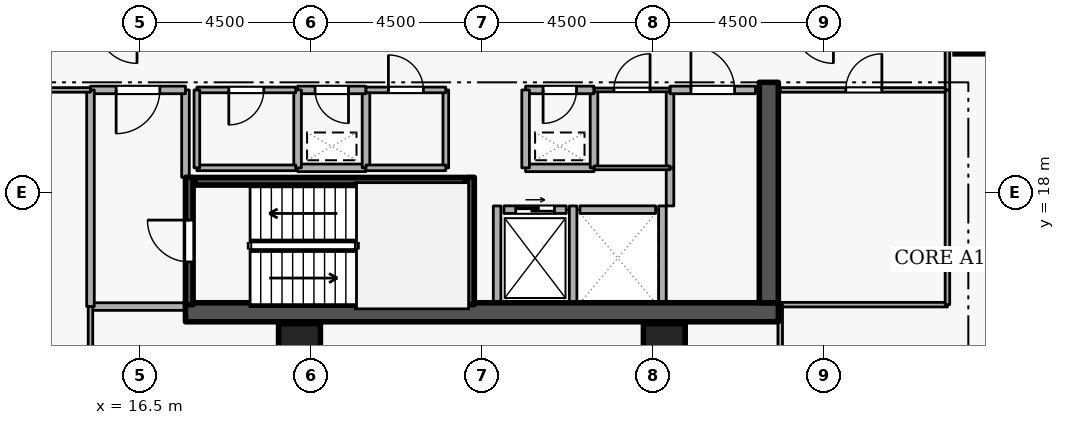
"""IFC4 building model, lengths in metres.
Left out: names, types, materials, properties, quantities, classifications, styles, units other than length and angle.
Written with IfcOpenShell. Run it as: python <this file> out.ifc"""

import sys

from ifc_helpers import new_model, si_unit, direction, frame, frame_2d, origin, origin_2d, place, context, subcontext, project, spatial, rectangle, extrude, element, fill, save


model = new_model("IFC4")
c1 = context("Model", 3, precision=1e-05, world=origin(), true_north=direction((0.0, 1.0)))
c2 = subcontext(c1, "Body", "Model", "MODEL_VIEW")
j1 = project(units=[si_unit("LENGTHUNIT", "METRE"), si_unit("PLANEANGLEUNIT", "RADIAN")], contexts=[c1])
p1 = place(None, origin())
s1 = spatial("IfcSite", under=j1, at=p1, CompositionType="ELEMENT")
p2 = place(p1, origin())
s2 = spatial("IfcBuilding", under=s1, at=p2, CompositionType="ELEMENT")
p3 = place(p2, frame((0.0, 0.0, 149.1)))
s3 = spatial("IfcBuildingStorey", under=s2, at=p3, CompositionType="ELEMENT", Elevation=149.1)
p4 = place(p3, frame((17.7, 14.85, 0.0), z_axis=(0.0, 0.0, 1.0), x_axis=(1.0, 0.0, 0.0)))
e1 = element("IfcWall", 1, at=p4, inside=s3, PredefinedType="SHEAR", context=c2, shape_type="SweptSolid", body=[
    extrude(rectangle(XDim=15.6, YDim=0.5, at=frame_2d((7.8, 0.0))), origin(), (0.0, 0.0, 1.0), 3.6),
])
p5 = place(p3, frame((33.05, 15.1, 0.0), z_axis=(0.0, 0.0, 1.0), x_axis=(0.0, 1.0, 0.0)))
e2 = element("IfcWall", 2, at=p5, inside=s3, PredefinedType="SHEAR", context=c2, shape_type="SweptSolid", body=[
    extrude(rectangle(XDim=5.8, YDim=0.5, at=frame_2d((2.9, 0.0))), origin(), (0.0, 0.0, 1.0), 3.6),
])
for number, where, z_axis, x_axis in (
    (3, (38.5, 22.2, 0.0), (0.0, 0.0, 1.0), (1.0, 0.0, 0.0)),
    (4, (20.7, 14.0, 0.0), (0.0, 0.0, 1.0), (1.0, 0.0, 0.0)),
    (5, (30.3, 14.0, 0.0), (0.0, 0.0, 1.0), (1.0, 0.0, 0.0)),
):
    element("IfcColumn", number, at=place(p3, frame(where, z_axis=z_axis, x_axis=x_axis)), inside=s3, PredefinedType="COLUMN", context=c2, shape_type="SweptSolid", body=[
        extrude(rectangle(XDim=1.1, YDim=1.1, at=origin_2d()), origin(), (0.0, 0.0, 1.0), 3.6),
    ])
p6 = place(p3, frame((26.08, 17.55, 0.0), z_axis=(0.0, 0.0, 1.0), x_axis=(1.0, 0.0, 0.0)))
e6 = element("IfcWall", 6, at=p6, inside=s3, PredefinedType="STANDARD", context=c2, shape_type="SweptSolid", body=[
    extrude(rectangle(XDim=1.64, YDim=0.2, at=frame_2d((0.82, 0.0))), origin(), (0.0, 0.0, 1.0), 3.3),
])
p7 = place(p6, frame((0.31, 0.0, 0.0)))
e7 = element("IfcOpeningElement", 7, at=p7, cuts=e6, PredefinedType="OPENING", context=c2, shape_type="SweptSolid", body=[
    extrude(rectangle(XDim=1.02, YDim=2.06, at=frame_2d((0.51, 1.03))), frame((0.0, 0.11, 0.0), z_axis=(0.0, -1.0, 0.0), x_axis=(1.0, 0.0, 0.0)), (0.0, 0.0, 1.0), 0.22),
])
p8 = place(p3, frame((28.08, 17.55, 0.0), z_axis=(0.0, 0.0, 1.0), x_axis=(1.0, 0.0, 0.0)))
e8 = element("IfcWall", 8, at=p8, inside=s3, PredefinedType="STANDARD", context=c2, shape_type="SweptSolid", body=[
    extrude(rectangle(XDim=1.99, YDim=0.2, at=frame_2d((0.995, 0.0))), origin(), (0.0, 0.0, 1.0), 3.3),
])
for number, where, z_axis, x_axis in (
    (9, (27.9, 15.112, 0.0), (0.0, 0.0, 1.0), (0.0, 1.0, 0.0)),
    (10, (25.9, 15.112, 0.0), (0.0, 0.0, 1.0), (0.0, 1.0, 0.0)),
    (11, (30.25, 15.112, 0.0), (0.0, 0.0, 1.0), (0.0, 1.0, 0.0)),
):
    element("IfcWall", number, at=place(p3, frame(where, z_axis=z_axis, x_axis=x_axis)), inside=s3, PredefinedType="STANDARD", context=c2, shape_type="SweptSolid", body=[
        extrude(rectangle(XDim=2.536, YDim=0.2, at=frame_2d((1.268, 0.0))), origin(), (0.0, 0.0, 1.0), 3.3),
    ])
p9 = place(p3, frame((17.8, 15.05, 0.0), z_axis=(0.0, 0.0, 1.0), x_axis=(0.0, 1.0, 0.0)))
e12 = element("IfcWall", 12, at=p9, inside=s3, PredefinedType="SHEAR", context=c2, shape_type="SweptSolid", body=[
    extrude(rectangle(XDim=3.35, YDim=0.2, at=frame_2d((1.675, 0.0))), origin(), (0.0, 0.0, 1.0), 3.6),
])
p10 = place(p9, frame((1.125, 0.0, 0.0)))
e13 = element("IfcOpeningElement", 13, at=p10, cuts=e12, PredefinedType="OPENING", context=c2, shape_type="SweptSolid", body=[
    extrude(rectangle(XDim=1.1, YDim=2.1, at=frame_2d((0.55, 1.05))), frame((0.0, 0.11, 0.0), z_axis=(0.0, -1.0, 0.0), x_axis=(1.0, 0.0, 0.0)), (0.0, 0.0, 1.0), 0.22),
])
p11 = place(p3, frame((25.2, 18.4, 0.0), z_axis=(0.0, 0.0, 1.0), x_axis=(0.0, -1.0, 0.0)))
e14 = element("IfcWall", 14, at=p11, inside=s3, PredefinedType="SHEAR", context=c2, shape_type="SweptSolid", body=[
    extrude(rectangle(XDim=3.35, YDim=0.2, at=frame_2d((1.675, 0.0))), origin(), (0.0, 0.0, 1.0), 3.6),
])
p12 = place(p3, frame((25.05, 18.297, 0.0), z_axis=(0.0, 0.0, 1.0), x_axis=(-1.0, 0.0, 0.0)))
e15 = element("IfcWall", 15, at=p12, inside=s3, PredefinedType="SHEAR", context=c2, shape_type="SweptSolid", body=[
    extrude(rectangle(XDim=7.1, YDim=0.2, at=frame_2d((3.55, 0.0))), origin(), (0.0, 0.0, 1.0), 3.6),
])
p13 = place(p3, frame((15.2, 15.0, 0.0), z_axis=(0.0, 0.0, 1.0), x_axis=(1.0, 0.0, 0.0)))
e16 = element("IfcWall", 16, at=p13, inside=s3, PredefinedType="STANDARD", context=c2, shape_type="SweptSolid", body=[
    extrude(rectangle(XDim=2.5, YDim=0.2, at=frame_2d((1.25, 0.0))), origin(), (0.0, 0.0, 1.0), 3.3),
])
p14 = place(p3, frame((17.7, 18.4, 0.0), z_axis=(0.0, 0.0, 1.0), x_axis=(0.0, 1.0, 0.0)))
e17 = element("IfcWall", 17, at=p14, inside=s3, PredefinedType="STANDARD", context=c2, shape_type="SweptSolid", body=[
    extrude(rectangle(XDim=2.3, YDim=0.2, at=frame_2d((1.15, 0.0))), origin(), (0.0, 0.0, 1.0), 2.505),
])
p15 = place(p3, frame((17.7, 20.7, 0.0), z_axis=(0.0, 0.0, 1.0), x_axis=(-1.0, 0.0, 0.0)))
e18 = element("IfcWall", 18, at=p15, inside=s3, PredefinedType="STANDARD", context=c2, shape_type="SweptSolid", body=[
    extrude(rectangle(XDim=2.5, YDim=0.2, at=frame_2d((1.25, 0.0))), origin(), (0.0, 0.0, 1.0), 3.3),
])
p16 = place(p15, frame((0.675, 0.0, 0.0)))
e19 = element("IfcOpeningElement", 19, at=p16, cuts=e18, PredefinedType="OPENING", context=c2, shape_type="SweptSolid", body=[
    extrude(rectangle(XDim=1.15, YDim=2.1, at=frame_2d((0.575, 1.05))), frame((0.0, 0.11, 0.0), z_axis=(0.0, -1.0, 0.0), x_axis=(1.0, 0.0, 0.0)), (0.0, 0.0, 1.0), 0.22),
])
p17 = place(p3, frame((15.2, 20.7, 0.0), z_axis=(0.0, 0.0, 1.0), x_axis=(0.0, -1.0, 0.0)))
e20 = element("IfcWall", 20, at=p17, inside=s3, PredefinedType="STANDARD", context=c2, shape_type="SweptSolid", body=[
    extrude(rectangle(XDim=5.7, YDim=0.2, at=frame_2d((2.85, 0.0))), origin(), (0.0, 0.0, 1.0), 3.3),
])
p18 = place(p3, frame((26.65, 18.65, 0.0), z_axis=(0.0, 0.0, 1.0), x_axis=(1.0, 0.0, 0.0)))
e21 = element("IfcWall", 21, at=p18, inside=s3, PredefinedType="STANDARD", context=c2, shape_type="SweptSolid", body=[
    extrude(rectangle(XDim=1.8, YDim=0.2, at=frame_2d((0.9, 0.0))), origin(), (0.0, 0.0, 1.0), 3.3),
])
p19 = place(p3, frame((28.45, 18.65, 0.0), z_axis=(0.0, 0.0, 1.0), x_axis=(0.0, 1.0, 0.0)))
e22 = element("IfcWall", 22, at=p19, inside=s3, PredefinedType="STANDARD", context=c2, shape_type="SweptSolid", body=[
    extrude(rectangle(XDim=2.05, YDim=0.2, at=frame_2d((1.025, 0.0))), origin(), (0.0, 0.0, 1.0), 3.3),
])
p20 = place(p3, frame((28.45, 20.7, 0.0), z_axis=(0.0, 0.0, 1.0), x_axis=(-1.0, 0.0, 0.0)))
e23 = element("IfcWall", 23, at=p20, inside=s3, PredefinedType="STANDARD", context=c2, shape_type="SweptSolid", body=[
    extrude(rectangle(XDim=1.8, YDim=0.2, at=frame_2d((0.9, 0.0))), origin(), (0.0, 0.0, 1.0), 3.3),
])
p21 = place(p20, frame((0.46, 0.0, 0.0)))
e24 = element("IfcOpeningElement", 24, at=p21, cuts=e23, PredefinedType="OPENING", context=c2, shape_type="SweptSolid", body=[
    extrude(rectangle(XDim=0.88, YDim=2.04, at=frame_2d((0.44, 1.02))), frame((0.0, 0.11, 0.0), z_axis=(0.0, -1.0, 0.0), x_axis=(1.0, 0.0, 0.0)), (0.0, 0.0, 1.0), 0.22),
])
p22 = place(p3, frame((26.65, 20.7, 0.0), z_axis=(0.0, 0.0, 1.0), x_axis=(0.0, -1.0, 0.0)))
e25 = element("IfcWall", 25, at=p22, inside=s3, PredefinedType="STANDARD", context=c2, shape_type="SweptSolid", body=[
    extrude(rectangle(XDim=2.05, YDim=0.2, at=frame_2d((1.025, 0.0))), origin(), (0.0, 0.0, 1.0), 3.3),
])
p23 = place(p3, frame((20.65, 18.65, 0.0), z_axis=(0.0, 0.0, 1.0), x_axis=(1.0, 0.0, 0.0)))
e26 = element("IfcWall", 26, at=p23, inside=s3, PredefinedType="STANDARD", context=c2, shape_type="SweptSolid", body=[
    extrude(rectangle(XDim=1.8, YDim=0.2, at=frame_2d((0.9, 0.0))), origin(), (0.0, 0.0, 1.0), 3.3),
])
p24 = place(p3, frame((22.45, 18.65, 0.0), z_axis=(0.0, 0.0, 1.0), x_axis=(0.0, 1.0, 0.0)))
e27 = element("IfcWall", 27, at=p24, inside=s3, PredefinedType="STANDARD", context=c2, shape_type="SweptSolid", body=[
    extrude(rectangle(XDim=2.05, YDim=0.2, at=frame_2d((1.025, 0.0))), origin(), (0.0, 0.0, 1.0), 3.3),
])
p25 = place(p3, frame((22.45, 20.7, 0.0), z_axis=(0.0, 0.0, 1.0), x_axis=(-1.0, 0.0, 0.0)))
e28 = element("IfcWall", 28, at=p25, inside=s3, PredefinedType="STANDARD", context=c2, shape_type="SweptSolid", body=[
    extrude(rectangle(XDim=1.8, YDim=0.2, at=frame_2d((0.9, 0.0))), origin(), (0.0, 0.0, 1.0), 3.3),
])
p26 = place(p25, frame((0.46, 0.0, 0.0)))
e29 = element("IfcOpeningElement", 29, at=p26, cuts=e28, PredefinedType="OPENING", context=c2, shape_type="SweptSolid", body=[
    extrude(rectangle(XDim=0.88, YDim=2.04, at=frame_2d((0.44, 1.02))), frame((0.0, 0.11, 0.0), z_axis=(0.0, -1.0, 0.0), x_axis=(1.0, 0.0, 0.0)), (0.0, 0.0, 1.0), 0.22),
])
p27 = place(p3, frame((20.65, 20.7, 0.0), z_axis=(0.0, 0.0, 1.0), x_axis=(0.0, -1.0, 0.0)))
e30 = element("IfcWall", 30, at=p27, inside=s3, PredefinedType="STANDARD", context=c2, shape_type="SweptSolid", body=[
    extrude(rectangle(XDim=2.05, YDim=0.2, at=frame_2d((1.025, 0.0))), origin(), (0.0, 0.0, 1.0), 3.3),
])
p28 = place(p3, frame((30.45, 17.648, 0.0), z_axis=(0.0, 0.0, 1.0), x_axis=(0.0, 1.0, 0.0)))
e31 = element("IfcWall", 31, at=p28, inside=s3, PredefinedType="STANDARD", context=c2, shape_type="SweptSolid", body=[
    extrude(rectangle(XDim=1.002, YDim=0.2, at=frame_2d((0.501, 0.0))), origin(), (0.0, 0.0, 1.0), 3.3),
])
p29 = place(p3, frame((30.45, 18.65, 0.0), z_axis=(0.0, 0.0, 1.0), x_axis=(0.0, 1.0, 0.0)))
e32 = element("IfcWall", 32, at=p29, inside=s3, PredefinedType="STANDARD", context=c2, shape_type="SweptSolid", body=[
    extrude(rectangle(XDim=2.05, YDim=0.2, at=frame_2d((1.025, 0.0))), origin(), (0.0, 0.0, 1.0), 3.3),
])
p30 = place(p3, frame((30.45, 20.7, 0.0), z_axis=(0.0, 0.0, 1.0), x_axis=(1.0, 0.0, 0.0)))
e33 = element("IfcWall", 33, at=p30, inside=s3, PredefinedType="STANDARD", context=c2, shape_type="SweptSolid", body=[
    extrude(rectangle(XDim=2.25, YDim=0.2, at=frame_2d((1.125, 0.0))), origin(), (0.0, 0.0, 1.0), 3.3),
])
p31 = place(p30, frame((0.55, 0.0, 0.0)))
e34 = element("IfcOpeningElement", 34, at=p31, cuts=e33, PredefinedType="OPENING", context=c2, shape_type="SweptSolid", body=[
    extrude(rectangle(XDim=1.15, YDim=2.1, at=frame_2d((0.575, 1.05))), frame((0.0, 0.11, 0.0), z_axis=(0.0, -1.0, 0.0), x_axis=(1.0, 0.0, 0.0)), (0.0, 0.0, 1.0), 0.22),
])
p32 = place(p3, frame((18.0, 18.65, 0.0), z_axis=(0.0, 0.0, 1.0), x_axis=(1.0, 0.0, 0.0)))
e35 = element("IfcWall", 35, at=p32, inside=s3, PredefinedType="PARTITIONING", context=c2, shape_type="SweptSolid", body=[
    extrude(rectangle(XDim=2.6, YDim=0.15, at=frame_2d((1.3, 0.0))), origin(), (0.0, 0.0, 1.0), 3.3),
])
p33 = place(p3, frame((20.6, 20.7, 0.0), z_axis=(0.0, 0.0, 1.0), x_axis=(-1.0, 0.0, 0.0)))
e36 = element("IfcWall", 36, at=p33, inside=s3, PredefinedType="PARTITIONING", context=c2, shape_type="SweptSolid", body=[
    extrude(rectangle(XDim=2.6, YDim=0.15, at=frame_2d((1.3, 0.0))), origin(), (0.0, 0.0, 1.0), 3.3),
])
p34 = place(p33, frame((0.84, 0.0, 0.0)))
e37 = element("IfcOpeningElement", 37, at=p34, cuts=e36, PredefinedType="OPENING", context=c2, shape_type="SweptSolid", body=[
    extrude(rectangle(XDim=0.92, YDim=2.08, at=frame_2d((0.46, 1.04))), frame((0.0, 0.085, 0.0), z_axis=(0.0, -1.0, 0.0), x_axis=(1.0, 0.0, 0.0)), (0.0, 0.0, 1.0), 0.17),
])
p35 = place(p3, frame((18.0, 20.7, 0.0), z_axis=(0.0, 0.0, 1.0), x_axis=(0.0, -1.0, 0.0)))
e38 = element("IfcWall", 38, at=p35, inside=s3, PredefinedType="PARTITIONING", context=c2, shape_type="SweptSolid", body=[
    extrude(rectangle(XDim=2.05, YDim=0.15, at=frame_2d((1.025, 0.0))), origin(), (0.0, 0.0, 1.0), 2.505),
])
p36 = place(p3, frame((24.55, 20.7, 0.0), z_axis=(0.0, 0.0, 1.0), x_axis=(0.0, -1.0, 0.0)))
e39 = element("IfcWall", 39, at=p36, inside=s3, PredefinedType="PARTITIONING", context=c2, shape_type="SweptSolid", body=[
    extrude(rectangle(XDim=2.05, YDim=0.15, at=frame_2d((1.025, 0.0))), origin(), (0.0, 0.0, 1.0), 3.3),
])
p37 = place(p3, frame((24.55, 18.65, 0.0), z_axis=(0.0, 0.0, 1.0), x_axis=(-1.0, 0.0, 0.0)))
e40 = element("IfcWall", 40, at=p37, inside=s3, PredefinedType="PARTITIONING", context=c2, shape_type="SweptSolid", body=[
    extrude(rectangle(XDim=2.1, YDim=0.15, at=frame_2d((1.05, 0.0))), origin(), (0.0, 0.0, 1.0), 3.3),
])
p38 = place(p3, frame((22.45, 20.7, 0.0), z_axis=(0.0, 0.0, 1.0), x_axis=(1.0, 0.0, 0.0)))
e41 = element("IfcWall", 41, at=p38, inside=s3, PredefinedType="PARTITIONING", context=c2, shape_type="SweptSolid", body=[
    extrude(rectangle(XDim=2.1, YDim=0.15, at=frame_2d((1.05, 0.0))), origin(), (0.0, 0.0, 1.0), 3.3),
])
p39 = place(p38, frame((0.59, 0.0, 0.0)))
e42 = element("IfcOpeningElement", 42, at=p39, cuts=e41, PredefinedType="OPENING", context=c2, shape_type="SweptSolid", body=[
    extrude(rectangle(XDim=0.92, YDim=2.08, at=frame_2d((0.46, 1.04))), frame((0.0, 0.085, 0.0), z_axis=(0.0, -1.0, 0.0), x_axis=(1.0, 0.0, 0.0)), (0.0, 0.0, 1.0), 0.17),
])
p40 = place(p3, frame((30.45, 18.65, 0.0), z_axis=(0.0, 0.0, 1.0), x_axis=(-1.0, 0.0, 0.0)))
e43 = element("IfcWall", 43, at=p40, inside=s3, PredefinedType="PARTITIONING", context=c2, shape_type="SweptSolid", body=[
    extrude(rectangle(XDim=2.0, YDim=0.1, at=frame_2d((1.0, 0.0))), origin(), (0.0, 0.0, 1.0), 3.3),
])
p41 = place(p3, frame((28.45, 20.7, 0.0), z_axis=(0.0, 0.0, 1.0), x_axis=(1.0, 0.0, 0.0)))
e44 = element("IfcWall", 44, at=p41, inside=s3, PredefinedType="PARTITIONING", context=c2, shape_type="SweptSolid", body=[
    extrude(rectangle(XDim=2.0, YDim=0.1, at=frame_2d((1.0, 0.0))), origin(), (0.0, 0.0, 1.0), 3.3),
])
p42 = place(p41, frame((0.525, 0.0, 0.0)))
e45 = element("IfcOpeningElement", 45, at=p42, cuts=e44, PredefinedType="OPENING", context=c2, shape_type="SweptSolid", body=[
    extrude(rectangle(XDim=0.95, YDim=2.1, at=frame_2d((0.475, 1.05))), frame((0.0, 0.06, 0.0), z_axis=(0.0, -1.0, 0.0), x_axis=(1.0, 0.0, 0.0)), (0.0, 0.0, 1.0), 0.12),
])
p43 = place(p3, frame((37.75, 15.05, 0.0), z_axis=(0.0, 0.0, 1.0), x_axis=(-1.0, 0.0, 0.0)))
e46 = element("IfcWall", 46, at=p43, inside=s3, PredefinedType="PARTITIONING", context=c2, shape_type="SweptSolid", body=[
    extrude(rectangle(XDim=4.4, YDim=0.12, at=frame_2d((2.2, 0.0))), origin(), (0.0, 0.0, 1.0), 3.3),
])
p44 = place(p3, frame((33.35, 20.7, 0.0), z_axis=(0.0, 0.0, 1.0), x_axis=(1.0, 0.0, 0.0)))
e47 = element("IfcWall", 47, at=p44, inside=s3, PredefinedType="PARTITIONING", context=c2, shape_type="SweptSolid", body=[
    extrude(rectangle(XDim=4.4, YDim=0.12, at=frame_2d((2.2, 0.0))), origin(), (0.0, 0.0, 1.0), 3.3),
])
p45 = place(p44, frame((1.725, 0.0, 0.0)))
e48 = element("IfcOpeningElement", 48, at=p45, cuts=e47, PredefinedType="OPENING", context=c2, shape_type="SweptSolid", body=[
    extrude(rectangle(XDim=0.95, YDim=2.1, at=frame_2d((0.475, 1.05))), frame((0.0, 0.07, 0.0), z_axis=(0.0, -1.0, 0.0), x_axis=(1.0, 0.0, 0.0)), (0.0, 0.0, 1.0), 0.14),
])
p46 = place(p3, frame((37.75, 20.7, 0.0), z_axis=(0.0, 0.0, 1.0), x_axis=(0.0, -1.0, 0.0)))
e49 = element("IfcWall", 49, at=p46, inside=s3, PredefinedType="PARTITIONING", context=c2, shape_type="SweptSolid", body=[
    extrude(rectangle(XDim=5.65, YDim=0.12, at=frame_2d((2.825, 0.0))), origin(), (0.0, 0.0, 1.0), 3.3),
])
p47 = place(p3, frame((13.25, 20.7, 0.0), z_axis=(0.0, 0.0, 1.0), x_axis=(1.0, 0.0, 0.0)))
e50 = element("IfcWall", 50, at=p47, inside=s3, PredefinedType="PARTITIONING", context=c2, shape_type="SweptSolid", body=[
    extrude(rectangle(XDim=1.95, YDim=0.12, at=frame_2d((0.975, 0.0))), origin(), (0.0, 0.0, 1.0), 3.3),
])
p48 = place(p3, frame((15.2, 15.0, 0.0), z_axis=(0.0, 0.0, 1.0), x_axis=(0.0, -1.0, 0.0)))
e51 = element("IfcWall", 51, at=p48, inside=s3, PredefinedType="PARTITIONING", context=c2, shape_type="SweptSolid", body=[
    extrude(rectangle(XDim=11.72, YDim=0.12, at=frame_2d((5.86, 0.0))), origin(), (0.0, 0.0, 1.0), 3.3),
])
p49 = place(p3, frame((33.35, 3.28, 0.0), z_axis=(0.0, 0.0, 1.0), x_axis=(0.0, 1.0, 0.0)))
e52 = element("IfcWall", 52, at=p49, inside=s3, PredefinedType="PARTITIONING", context=c2, shape_type="SweptSolid", body=[
    extrude(rectangle(XDim=11.77, YDim=0.12, at=frame_2d((5.885, 0.0))), origin(), (0.0, 0.0, 1.0), 2.505),
])
p50 = place(p3, frame((37.75, 20.7, 0.0), z_axis=(0.0, 0.0, 1.0), x_axis=(0.0, 1.0, 0.0)))
e53 = element("IfcWall", 53, at=p50, inside=s3, PredefinedType="PARTITIONING", context=c2, shape_type="SweptSolid", body=[
    extrude(rectangle(XDim=1.75, YDim=0.12, at=frame_2d((0.875, 0.0))), origin(), (0.0, 0.0, 1.0), 3.3),
])
p51 = place(p7, origin())
e54 = element("IfcDoor", 54, at=p51, inside=s3, OperationType="SLIDING_TO_LEFT", PredefinedType="DOOR", context=c2, shape_type="SweptSolid", body=[
    extrude(rectangle(XDim=1.02, YDim=2.06, at=frame_2d((0.51, 1.03))), frame((0.0, 0.025, 0.0), z_axis=(0.0, -1.0, 0.0), x_axis=(1.0, 0.0, 0.0)), (0.0, 0.0, 1.0), 0.05),
])
fill(e7, e54)
p52 = place(p10, origin())
e55 = element("IfcDoor", 55, at=p52, inside=s3, OperationType="SINGLE_SWING_RIGHT", PredefinedType="DOOR", context=c2, shape_type="SweptSolid", body=[
    extrude(rectangle(XDim=1.1, YDim=2.1, at=frame_2d((0.55, 1.05))), frame((0.0, 0.025, 0.0), z_axis=(0.0, -1.0, 0.0), x_axis=(1.0, 0.0, 0.0)), (0.0, 0.0, 1.0), 0.05),
])
fill(e13, e55)
p53 = place(p16, origin())
e56 = element("IfcDoor", 56, at=p53, inside=s3, OperationType="SINGLE_SWING_RIGHT", PredefinedType="DOOR", context=c2, shape_type="SweptSolid", body=[
    extrude(rectangle(XDim=1.15, YDim=2.1, at=frame_2d((0.575, 1.05))), frame((0.0, 0.025, 0.0), z_axis=(0.0, -1.0, 0.0), x_axis=(1.0, 0.0, 0.0)), (0.0, 0.0, 1.0), 0.05),
])
fill(e19, e56)
p54 = place(p21, origin())
e57 = element("IfcDoor", 57, at=p54, inside=s3, OperationType="SINGLE_SWING_RIGHT", PredefinedType="DOOR", context=c2, shape_type="SweptSolid", body=[
    extrude(rectangle(XDim=0.88, YDim=2.04, at=frame_2d((0.44, 1.02))), frame((0.0, 0.025, 0.0), z_axis=(0.0, -1.0, 0.0), x_axis=(1.0, 0.0, 0.0)), (0.0, 0.0, 1.0), 0.05),
])
fill(e24, e57)
p55 = place(p26, origin())
e58 = element("IfcDoor", 58, at=p55, inside=s3, OperationType="SINGLE_SWING_LEFT", PredefinedType="DOOR", context=c2, shape_type="SweptSolid", body=[
    extrude(rectangle(XDim=0.88, YDim=2.04, at=frame_2d((0.44, 1.02))), frame((0.0, 0.025, 0.0), z_axis=(0.0, -1.0, 0.0), x_axis=(1.0, 0.0, 0.0)), (0.0, 0.0, 1.0), 0.05),
])
fill(e29, e58)
p56 = place(p34, origin())
e59 = element("IfcDoor", 59, at=p56, inside=s3, OperationType="SINGLE_SWING_RIGHT", PredefinedType="DOOR", context=c2, shape_type="SweptSolid", body=[
    extrude(rectangle(XDim=0.92, YDim=2.08, at=frame_2d((0.46, 1.04))), frame((0.0, 0.025, 0.0), z_axis=(0.0, -1.0, 0.0), x_axis=(1.0, 0.0, 0.0)), (0.0, 0.0, 1.0), 0.05),
])
fill(e37, e59)
p57 = place(p39, origin())
e60 = element("IfcDoor", 60, at=p57, inside=s3, OperationType="SINGLE_SWING_LEFT", PredefinedType="DOOR", context=c2, shape_type="SweptSolid", body=[
    extrude(rectangle(XDim=0.92, YDim=2.08, at=frame_2d((0.46, 1.04))), frame((0.0, 0.025, 0.0), z_axis=(0.0, -1.0, 0.0), x_axis=(1.0, 0.0, 0.0)), (0.0, 0.0, 1.0), 0.05),
])
fill(e42, e60)
p58 = place(p42, origin())
e61 = element("IfcDoor", 61, at=p58, inside=s3, OperationType="SINGLE_SWING_RIGHT", PredefinedType="DOOR", context=c2, shape_type="SweptSolid", body=[
    extrude(rectangle(XDim=0.95, YDim=2.1, at=frame_2d((0.475, 1.05))), frame((0.0, 0.025, 0.0), z_axis=(0.0, -1.0, 0.0), x_axis=(1.0, 0.0, 0.0)), (0.0, 0.0, 1.0), 0.05),
])
fill(e45, e61)
p59 = place(p31, origin())
e62 = element("IfcDoor", 62, at=p59, inside=s3, OperationType="SINGLE_SWING_LEFT", PredefinedType="DOOR", context=c2, shape_type="SweptSolid", body=[
    extrude(rectangle(XDim=1.15, YDim=2.1, at=frame_2d((0.575, 1.05))), frame((0.0, 0.025, 0.0), z_axis=(0.0, -1.0, 0.0), x_axis=(1.0, 0.0, 0.0)), (0.0, 0.0, 1.0), 0.05),
])
fill(e34, e62)
p60 = place(p45, origin())
e63 = element("IfcDoor", 63, at=p60, inside=s3, OperationType="SINGLE_SWING_RIGHT", PredefinedType="DOOR", context=c2, shape_type="SweptSolid", body=[
    extrude(rectangle(XDim=0.95, YDim=2.1, at=frame_2d((0.475, 1.05))), frame((0.0, 0.025, 0.0), z_axis=(0.0, -1.0, 0.0), x_axis=(1.0, 0.0, 0.0)), (0.0, 0.0, 1.0), 0.05),
])
fill(e48, e63)
save(model, sys.argv[1])
